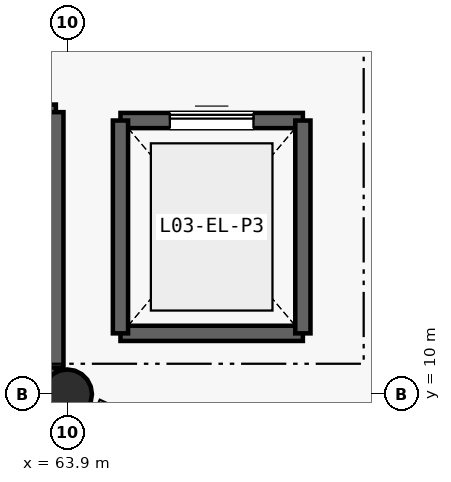
"""IFC4 building model, lengths in metres.
Left out: names, types, materials, properties, quantities, classifications, styles, units other than length and angle.
Written with IfcOpenShell. Run it as: python <this file> out.ifc"""

import sys

from ifc_helpers import new_model, si_unit, direction, frame, frame_2d, origin, origin_2d, place, context, subcontext, project, spatial, rectangle, circle, extrude, element, fill, save


model = new_model("IFC4")
c1 = context("Model", 3, precision=1e-05, world=origin(), true_north=direction((0.0, 1.0)))
c2 = subcontext(c1, "Body", "Model", "MODEL_VIEW")
j1 = project(units=[si_unit("LENGTHUNIT", "METRE"), si_unit("PLANEANGLEUNIT", "RADIAN")], contexts=[c1])
p1 = place(None, origin())
s1 = spatial("IfcSite", under=j1, at=p1, CompositionType="ELEMENT")
p2 = place(p1, origin())
s2 = spatial("IfcBuilding", under=s1, at=p2, CompositionType="ELEMENT")
p3 = place(p2, frame((0.0, 0.0, 12.6)))
s3 = spatial("IfcBuildingStorey", under=s2, at=p3, CompositionType="ELEMENT", Elevation=12.6)
p4 = place(p3, frame((63.9, 10.0, 0.0), z_axis=(0.0, 0.0, 1.0), x_axis=(1.0, 0.0, 0.0)))
e1 = element("IfcColumn", 1, at=p4, inside=s3, PredefinedType="COLUMN", context=c2, shape_type="SweptSolid", body=[
    extrude(circle(Radius=0.325, at=origin_2d()), origin(), (0.0, 0.0, 1.0), 4.2),
])
p5 = place(p3, frame((57.45, 10.35, 0.0), z_axis=(0.0, 0.0, 1.0), x_axis=(1.0, 0.0, 0.0)))
e2 = element("IfcWall", 2, at=p5, inside=s3, PredefinedType="SHEAR", context=c2, shape_type="SweptSolid", body=[
    extrude(rectangle(XDim=6.3, YDim=0.2, at=frame_2d((3.15, 0.0))), origin(), (0.0, 0.0, 1.0), 4.2),
])
p6 = place(p3, frame((57.45, 13.71, 0.0), z_axis=(0.0, 0.0, 1.0), x_axis=(1.0, 0.0, 0.0)))
e3 = element("IfcWall", 3, at=p6, inside=s3, PredefinedType="SHEAR", context=c2, shape_type="SweptSolid", body=[
    extrude(rectangle(XDim=6.3, YDim=0.2, at=frame_2d((3.15, 0.0))), origin(), (0.0, 0.0, 1.0), 4.2),
])
p7 = place(p6, frame((0.32, 0.0, 0.0)))
e4 = element("IfcOpeningElement", 4, at=p7, cuts=e3, PredefinedType="OPENING", context=c2, shape_type="SweptSolid", body=[
    extrude(rectangle(XDim=1.2, YDim=2.15, at=frame_2d((0.6, 1.075))), frame((0.0, 0.11, 0.0), z_axis=(0.0, -1.0, 0.0), x_axis=(1.0, 0.0, 0.0)), (0.0, 0.0, 1.0), 0.22),
])
p8 = place(p3, frame((63.75, 10.35, 0.0), z_axis=(0.0, 0.0, 1.0), x_axis=(0.0, 1.0, 0.0)))
e5 = element("IfcWall", 5, at=p8, inside=s3, PredefinedType="SHEAR", context=c2, shape_type="SweptSolid", body=[
    extrude(rectangle(XDim=3.36, YDim=0.2, at=frame_2d((1.68, 0.0))), origin(), (0.0, 0.0, 1.0), 4.2),
])
p9 = place(p3, frame((64.6, 10.8, 0.0), z_axis=(0.0, 0.0, 1.0), x_axis=(1.0, 0.0, 0.0)))
e6 = element("IfcWall", 6, at=p9, inside=s3, PredefinedType="SHEAR", context=c2, shape_type="SweptSolid", body=[
    extrude(rectangle(XDim=2.4, YDim=0.2, at=frame_2d((1.2, 0.0))), origin(), (0.0, 0.0, 1.0), 4.2),
])
p10 = place(p3, frame((64.6, 13.6, 0.0), z_axis=(0.0, 0.0, 1.0), x_axis=(1.0, 0.0, 0.0)))
e7 = element("IfcWall", 7, at=p10, inside=s3, PredefinedType="SHEAR", context=c2, shape_type="SweptSolid", body=[
    extrude(rectangle(XDim=2.4, YDim=0.2, at=frame_2d((1.2, 0.0))), origin(), (0.0, 0.0, 1.0), 4.2),
])
p11 = place(p10, frame((0.65, 0.0, 0.0)))
e8 = element("IfcOpeningElement", 8, at=p11, cuts=e7, PredefinedType="OPENING", context=c2, shape_type="SweptSolid", body=[
    extrude(rectangle(XDim=1.1, YDim=2.15, at=frame_2d((0.55, 1.075))), frame((0.0, 0.11, 0.0), z_axis=(0.0, -1.0, 0.0), x_axis=(1.0, 0.0, 0.0)), (0.0, 0.0, 1.0), 0.22),
])
for number, where, z_axis, x_axis in (
    (9, (64.6, 10.8, 0.0), (0.0, 0.0, 1.0), (0.0, 1.0, 0.0)),
    (10, (67.0, 10.8, 0.0), (0.0, 0.0, 1.0), (0.0, 1.0, 0.0)),
):
    element("IfcWall", number, at=place(p3, frame(where, z_axis=z_axis, x_axis=x_axis)), inside=s3, PredefinedType="SHEAR", context=c2, shape_type="SweptSolid", body=[
        extrude(rectangle(XDim=2.8, YDim=0.2, at=frame_2d((1.4, 0.0))), origin(), (0.0, 0.0, 1.0), 4.2),
    ])
p12 = place(p11, origin())
e11 = element("IfcDoor", 11, at=p12, inside=s3, OperationType="SLIDING_TO_LEFT", PredefinedType="DOOR", context=c2, shape_type="SweptSolid", body=[
    extrude(rectangle(XDim=1.1, YDim=2.15, at=frame_2d((0.55, 1.075))), frame((0.0, 0.025, 0.0), z_axis=(0.0, -1.0, 0.0), x_axis=(1.0, 0.0, 0.0)), (0.0, 0.0, 1.0), 0.05),
])
fill(e8, e11)
save(model, sys.argv[1])
